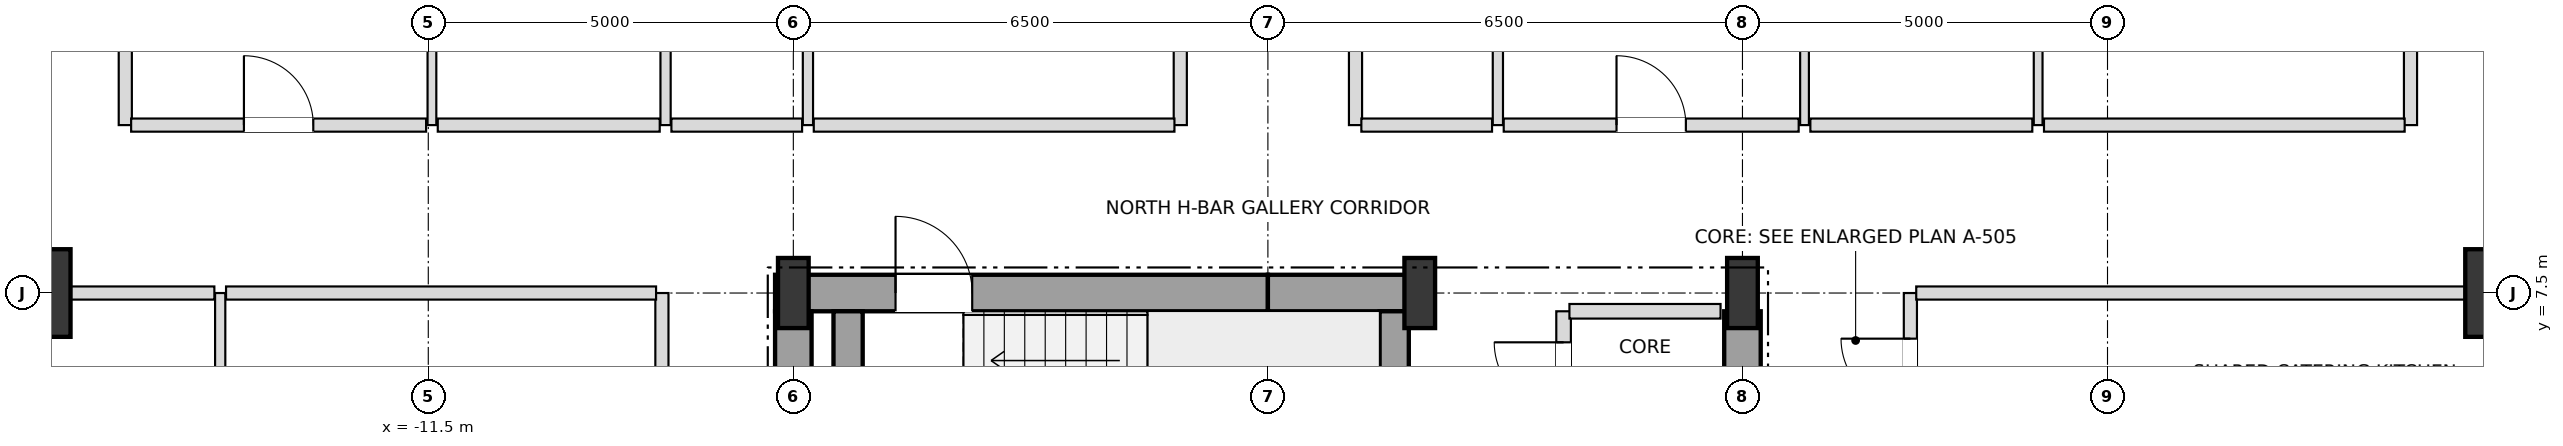
"""IFC4 building model, lengths in metres.
Left out: names, types, materials, properties, quantities, classifications, styles, units other than length and angle.
Written with IfcOpenShell. Run it as: python <this file> out.ifc"""

import sys

from ifc_helpers import new_model, si_unit, direction, frame, frame_2d, origin, origin_2d, place, context, subcontext, project, spatial, rectangle, i_section, extrude, element, fill, save


model = new_model("IFC4")
c1 = context("Model", 3, precision=1e-05, world=origin(), true_north=direction((0.0, 1.0)))
c2 = subcontext(c1, "Body", "Model", "MODEL_VIEW")
j1 = project(units=[si_unit("LENGTHUNIT", "METRE"), si_unit("PLANEANGLEUNIT", "RADIAN")], contexts=[c1])
p1 = place(None, origin())
s1 = spatial("IfcSite", under=j1, at=p1, CompositionType="ELEMENT")
p2 = place(p1, origin())
s2 = spatial("IfcBuilding", under=s1, at=p2, CompositionType="ELEMENT")
p3 = place(p2, frame((0.0, 0.0, 133.2)))
s3 = spatial("IfcBuildingStorey", under=s2, at=p3, CompositionType="ELEMENT", Elevation=133.2)
for number, where, z_axis, x_axis in (
    (1, (-6.5, 7.5, 0.0), (0.0, 0.0, 1.0), (1.0, 0.0, 0.0)),
    (2, (2.08, 7.5, 0.0), (0.0, 0.0, 1.0), (1.0, 0.0, 0.0)),
    (3, (6.5, 7.5, 0.0), (0.0, 0.0, 1.0), (1.0, 0.0, 0.0)),
):
    element("IfcColumn", number, at=place(p3, frame(where, z_axis=z_axis, x_axis=x_axis)), inside=s3, PredefinedType="COLUMN", context=c2, shape_type="SweptSolid", body=[
        extrude(i_section(OverallWidth=0.42, OverallDepth=0.96, WebThickness=0.022, FlangeThickness=0.034, at=origin_2d()), origin(), (0.0, 0.0, 1.0), 3.6),
    ])
for number, where, z_axis, x_axis in (
    (4, (17.0, 7.5, 0.0), (0.0, 0.0, 1.0), (1.0, 0.0, 0.0)),
    (5, (-17.0, 7.5, 0.0), (0.0, 0.0, 1.0), (1.0, 0.0, 0.0)),
):
    element("IfcColumn", number, at=place(p3, frame(where, z_axis=z_axis, x_axis=x_axis)), inside=s3, PredefinedType="USERDEFINED", context=c2, shape_type="SweptSolid", body=[
        extrude(rectangle(XDim=1.2, YDim=1.2, at=origin_2d()), origin(), (0.0, 0.0, 1.0), 3.6),
    ])
p4 = place(p3, frame((-6.75, 7.5, 0.0), z_axis=(0.0, 0.0, 1.0), x_axis=(1.0, 0.0, 0.0)))
e6 = element("IfcWall", 6, at=p4, inside=s3, PredefinedType="SHEAR", context=c2, shape_type="SweptSolid", body=[
    extrude(rectangle(XDim=6.75, YDim=0.5, at=frame_2d((3.375, 0.0))), origin(), (0.0, 0.0, 1.0), 3.38),
])
p5 = place(p4, frame((1.65, 0.0, 0.0)))
e7 = element("IfcOpeningElement", 7, at=p5, cuts=e6, PredefinedType="OPENING", context=c2, shape_type="SweptSolid", body=[
    extrude(rectangle(XDim=1.05, YDim=2.15, at=frame_2d((0.525, 1.075))), frame((0.0, 0.26, 0.0), z_axis=(0.0, -1.0, 0.0), x_axis=(1.0, 0.0, 0.0)), (0.0, 0.0, 1.0), 0.52),
])
p6 = place(p3, frame((0.0, 7.5, 0.0), z_axis=(0.0, 0.0, 1.0), x_axis=(1.0, 0.0, 0.0)))
e8 = element("IfcWall", 8, at=p6, inside=s3, PredefinedType="SHEAR", context=c2, shape_type="SweptSolid", body=[
    extrude(rectangle(XDim=2.08, YDim=0.5, at=frame_2d((1.04, 0.0))), origin(), (0.0, 0.0, 1.0), 3.38),
])
for number, where, z_axis, x_axis in (
    (9, (-6.5, 3.95, 0.0), (0.0, 0.0, 1.0), (0.0, 1.0, 0.0)),
    (10, (6.5, 3.95, 0.0), (0.0, 0.0, 1.0), (0.0, 1.0, 0.0)),
):
    element("IfcWall", number, at=place(p3, frame(where, z_axis=z_axis, x_axis=x_axis)), inside=s3, PredefinedType="SHEAR", context=c2, shape_type="SweptSolid", body=[
        extrude(rectangle(XDim=3.3, YDim=0.5, at=frame_2d((1.65, 0.0))), origin(), (0.0, 0.0, 1.0), 3.38),
    ])
for number, where, z_axis, x_axis in (
    (11, (1.73, 3.95, 0.0), (0.0, 0.0, 1.0), (0.0, 1.0, 0.0)),
    (12, (-5.75, 3.95, 0.0), (0.0, 0.0, 1.0), (0.0, 1.0, 0.0)),
):
    element("IfcWall", number, at=place(p3, frame(where, z_axis=z_axis, x_axis=x_axis)), inside=s3, PredefinedType="SHEAR", context=c2, shape_type="SweptSolid", body=[
        extrude(rectangle(XDim=3.3, YDim=0.4, at=frame_2d((1.65, 0.0))), origin(), (0.0, 0.0, 1.0), 3.38),
    ])
p7 = place(p3, frame((-15.65, 9.8, 0.0), z_axis=(0.0, 0.0, 1.0), x_axis=(0.0, 1.0, 0.0)))
e13 = element("IfcWall", 13, at=p7, inside=s3, PredefinedType="PARTITIONING", context=c2, shape_type="SweptSolid", body=[
    extrude(rectangle(XDim=7.35, YDim=0.18, at=frame_2d((3.675, 0.0))), origin(), (0.0, 0.0, 1.0), 2.736),
])
p8 = place(p3, frame((-14.35, -7.5, 0.0), z_axis=(0.0, 0.0, 1.0), x_axis=(0.0, 1.0, 0.0)))
e14 = element("IfcWall", 14, at=p8, inside=s3, PredefinedType="PARTITIONING", context=c2, shape_type="SweptSolid", body=[
    extrude(rectangle(XDim=15.0, YDim=0.14, at=frame_2d((7.5, 0.0))), origin(), (0.0, 0.0, 1.0), 3.38),
])
p9 = place(p8, frame((3.475, 0.0, 0.0)))
e15 = element("IfcOpeningElement", 15, at=p9, cuts=e14, PredefinedType="OPENING", context=c2, shape_type="SweptSolid", body=[
    extrude(rectangle(XDim=0.95, YDim=2.1, at=frame_2d((0.475, 1.05))), frame((0.0, 0.08, 0.0), z_axis=(0.0, -1.0, 0.0), x_axis=(1.0, 0.0, 0.0)), (0.0, 0.0, 1.0), 0.16),
])
p10 = place(p3, frame((-11.45, 9.8, 0.0), z_axis=(0.0, 0.0, 1.0), x_axis=(0.0, 1.0, 0.0)))
e16 = element("IfcWall", 16, at=p10, inside=s3, PredefinedType="PARTITIONING", context=c2, shape_type="SweptSolid", body=[
    extrude(rectangle(XDim=7.35, YDim=0.12, at=frame_2d((3.675, 0.0))), origin(), (0.0, 0.0, 1.0), 2.736),
])
p11 = place(p10, frame((3.713, 0.0, 0.0)))
e17 = element("IfcOpeningElement", 17, at=p11, cuts=e16, PredefinedType="OPENING", context=c2, shape_type="SweptSolid", body=[
    extrude(rectangle(XDim=0.95, YDim=2.1, at=frame_2d((0.475, 1.05))), frame((0.0, 0.07, 0.0), z_axis=(0.0, -1.0, 0.0), x_axis=(1.0, 0.0, 0.0)), (0.0, 0.0, 1.0), 0.14),
])
p12 = place(p3, frame((-8.3, -7.5, 0.0), z_axis=(0.0, 0.0, 1.0), x_axis=(0.0, 1.0, 0.0)))
e18 = element("IfcWall", 18, at=p12, inside=s3, PredefinedType="PARTITIONING", context=c2, shape_type="SweptSolid", body=[
    extrude(rectangle(XDim=15.0, YDim=0.18, at=frame_2d((7.5, 0.0))), origin(), (0.0, 0.0, 1.0), 3.38),
])
p13 = place(p12, frame((2.495, 0.0, 0.0)))
e19 = element("IfcOpeningElement", 19, at=p13, cuts=e18, PredefinedType="OPENING", context=c2, shape_type="SweptSolid", body=[
    extrude(rectangle(XDim=0.95, YDim=2.15, at=frame_2d((0.475, 1.075))), frame((0.0, 0.1, 0.0), z_axis=(0.0, -1.0, 0.0), x_axis=(1.0, 0.0, 0.0)), (0.0, 0.0, 1.0), 0.2),
])
p14 = place(p3, frame((-8.25, 9.8, 0.0), z_axis=(0.0, 0.0, 1.0), x_axis=(0.0, 1.0, 0.0)))
e20 = element("IfcWall", 20, at=p14, inside=s3, PredefinedType="PARTITIONING", context=c2, shape_type="SweptSolid", body=[
    extrude(rectangle(XDim=7.35, YDim=0.14, at=frame_2d((3.675, 0.0))), origin(), (0.0, 0.0, 1.0), 2.816),
])
p15 = place(p14, frame((3.22, 0.0, 0.0)))
e21 = element("IfcOpeningElement", 21, at=p15, cuts=e20, PredefinedType="OPENING", context=c2, shape_type="SweptSolid", body=[
    extrude(rectangle(XDim=0.9, YDim=2.1, at=frame_2d((0.45, 1.05))), frame((0.0, 0.08, 0.0), z_axis=(0.0, -1.0, 0.0), x_axis=(1.0, 0.0, 0.0)), (0.0, 0.0, 1.0), 0.16),
])
p16 = place(p3, frame((-6.3, 9.8, 0.0), z_axis=(0.0, 0.0, 1.0), x_axis=(0.0, 1.0, 0.0)))
e22 = element("IfcWall", 22, at=p16, inside=s3, PredefinedType="PARTITIONING", context=c2, shape_type="SweptSolid", body=[
    extrude(rectangle(XDim=13.35, YDim=0.14, at=frame_2d((6.675, 0.0))), origin(), (0.0, 0.0, 1.0), 2.816),
])
p17 = place(p16, frame((11.051, 0.0, 0.0)))
e23 = element("IfcOpeningElement", 23, at=p17, cuts=e22, PredefinedType="OPENING", context=c2, shape_type="SweptSolid", body=[
    extrude(rectangle(XDim=0.9, YDim=2.1, at=frame_2d((0.45, 1.05))), frame((0.0, 0.08, 0.0), z_axis=(0.0, -1.0, 0.0), x_axis=(1.0, 0.0, 0.0)), (0.0, 0.0, 1.0), 0.16),
])
for number, where, z_axis, x_axis in (
    (24, (-1.2, 9.8, 0.0), (0.0, 0.0, 1.0), (0.0, 1.0, 0.0)),
    (25, (1.2, 9.8, 0.0), (0.0, 0.0, 1.0), (0.0, 1.0, 0.0)),
):
    element("IfcWall", number, at=place(p3, frame(where, z_axis=z_axis, x_axis=x_axis)), inside=s3, PredefinedType="PARTITIONING", context=c2, shape_type="SweptSolid", body=[
        extrude(rectangle(XDim=13.35, YDim=0.18, at=frame_2d((6.675, 0.0))), origin(), (0.0, 0.0, 1.0), 2.816),
    ])
p18 = place(p3, frame((3.15, 9.8, 0.0), z_axis=(0.0, 0.0, 1.0), x_axis=(0.0, 1.0, 0.0)))
e26 = element("IfcWall", 26, at=p18, inside=s3, PredefinedType="PARTITIONING", context=c2, shape_type="SweptSolid", body=[
    extrude(rectangle(XDim=7.35, YDim=0.14, at=frame_2d((3.675, 0.0))), origin(), (0.0, 0.0, 1.0), 3.38),
])
p19 = place(p18, frame((3.22, 0.0, 0.0)))
e27 = element("IfcOpeningElement", 27, at=p19, cuts=e26, PredefinedType="OPENING", context=c2, shape_type="SweptSolid", body=[
    extrude(rectangle(XDim=0.9, YDim=2.1, at=frame_2d((0.45, 1.05))), frame((0.0, 0.08, 0.0), z_axis=(0.0, -1.0, 0.0), x_axis=(1.0, 0.0, 0.0)), (0.0, 0.0, 1.0), 0.16),
])
p20 = place(p3, frame((4.05, 5.55, 0.0), z_axis=(0.0, 0.0, 1.0), x_axis=(0.0, 1.0, 0.0)))
e28 = element("IfcWall", 28, at=p20, inside=s3, PredefinedType="SOLIDWALL", context=c2, shape_type="SweptSolid", body=[
    extrude(rectangle(XDim=1.7, YDim=0.2, at=frame_2d((0.85, 0.0))), origin(), (0.0, 0.0, 1.0), 3.38),
])
p21 = place(p20, frame((0.325, 0.0, 0.0)))
e29 = element("IfcOpeningElement", 29, at=p21, cuts=e28, PredefinedType="OPENING", context=c2, shape_type="SweptSolid", body=[
    extrude(rectangle(XDim=0.95, YDim=2.15, at=frame_2d((0.475, 1.075))), frame((0.0, 0.11, 0.0), z_axis=(0.0, -1.0, 0.0), x_axis=(1.0, 0.0, 0.0)), (0.0, 0.0, 1.0), 0.22),
])
p22 = place(p3, frame((7.35, 9.8, 0.0), z_axis=(0.0, 0.0, 1.0), x_axis=(0.0, 1.0, 0.0)))
e30 = element("IfcWall", 30, at=p22, inside=s3, PredefinedType="PARTITIONING", context=c2, shape_type="SweptSolid", body=[
    extrude(rectangle(XDim=13.35, YDim=0.12, at=frame_2d((6.675, 0.0))), origin(), (0.0, 0.0, 1.0), 2.816),
])
p23 = place(p22, frame((3.195, 0.0, 0.0)))
e31 = element("IfcOpeningElement", 31, at=p23, cuts=e30, PredefinedType="OPENING", context=c2, shape_type="SweptSolid", body=[
    extrude(rectangle(XDim=0.95, YDim=2.1, at=frame_2d((0.475, 1.05))), frame((0.0, 0.07, 0.0), z_axis=(0.0, -1.0, 0.0), x_axis=(1.0, 0.0, 0.0)), (0.0, 0.0, 1.0), 0.14),
])
p24 = place(p22, frame((11.051, 0.0, 0.0)))
e32 = element("IfcOpeningElement", 32, at=p24, cuts=e30, PredefinedType="OPENING", context=c2, shape_type="SweptSolid", body=[
    extrude(rectangle(XDim=0.9, YDim=2.1, at=frame_2d((0.45, 1.05))), frame((0.0, 0.07, 0.0), z_axis=(0.0, -1.0, 0.0), x_axis=(1.0, 0.0, 0.0)), (0.0, 0.0, 1.0), 0.14),
])
p25 = place(p3, frame((8.8, -7.5, 0.0), z_axis=(0.0, 0.0, 1.0), x_axis=(0.0, 1.0, 0.0)))
e33 = element("IfcWall", 33, at=p25, inside=s3, PredefinedType="PARTITIONING", context=c2, shape_type="SweptSolid", body=[
    extrude(rectangle(XDim=15.0, YDim=0.18, at=frame_2d((7.5, 0.0))), origin(), (0.0, 0.0, 1.0), 3.38),
])
p26 = place(p25, frame((2.075, 0.0, 0.0)))
e34 = element("IfcOpeningElement", 34, at=p26, cuts=e33, PredefinedType="OPENING", context=c2, shape_type="SweptSolid", body=[
    extrude(rectangle(XDim=0.95, YDim=2.15, at=frame_2d((0.475, 1.075))), frame((0.0, 0.1, 0.0), z_axis=(0.0, -1.0, 0.0), x_axis=(1.0, 0.0, 0.0)), (0.0, 0.0, 1.0), 0.2),
])
p27 = place(p25, frame((8.475, 0.0, 0.0)))
e35 = element("IfcOpeningElement", 35, at=p27, cuts=e33, PredefinedType="OPENING", context=c2, shape_type="SweptSolid", body=[
    extrude(rectangle(XDim=0.95, YDim=2.15, at=frame_2d((0.475, 1.075))), frame((0.0, 0.1, 0.0), z_axis=(0.0, -1.0, 0.0), x_axis=(1.0, 0.0, 0.0)), (0.0, 0.0, 1.0), 0.2),
])
p28 = place(p25, frame((13.425, 0.0, 0.0)))
e36 = element("IfcOpeningElement", 36, at=p28, cuts=e33, PredefinedType="OPENING", context=c2, shape_type="SweptSolid", body=[
    extrude(rectangle(XDim=0.95, YDim=2.15, at=frame_2d((0.475, 1.075))), frame((0.0, 0.1, 0.0), z_axis=(0.0, -1.0, 0.0), x_axis=(1.0, 0.0, 0.0)), (0.0, 0.0, 1.0), 0.2),
])
p29 = place(p3, frame((10.55, 9.8, 0.0), z_axis=(0.0, 0.0, 1.0), x_axis=(0.0, 1.0, 0.0)))
e37 = element("IfcWall", 37, at=p29, inside=s3, PredefinedType="PARTITIONING", context=c2, shape_type="SweptSolid", body=[
    extrude(rectangle(XDim=13.35, YDim=0.12, at=frame_2d((6.675, 0.0))), origin(), (0.0, 0.0, 1.0), 2.816),
])
p30 = place(p29, frame((3.713, 0.0, 0.0)))
e38 = element("IfcOpeningElement", 38, at=p30, cuts=e37, PredefinedType="OPENING", context=c2, shape_type="SweptSolid", body=[
    extrude(rectangle(XDim=0.95, YDim=2.1, at=frame_2d((0.475, 1.05))), frame((0.0, 0.07, 0.0), z_axis=(0.0, -1.0, 0.0), x_axis=(1.0, 0.0, 0.0)), (0.0, 0.0, 1.0), 0.14),
])
p31 = place(p29, frame((11.051, 0.0, 0.0)))
e39 = element("IfcOpeningElement", 39, at=p31, cuts=e37, PredefinedType="OPENING", context=c2, shape_type="SweptSolid", body=[
    extrude(rectangle(XDim=0.9, YDim=2.1, at=frame_2d((0.45, 1.05))), frame((0.0, 0.07, 0.0), z_axis=(0.0, -1.0, 0.0), x_axis=(1.0, 0.0, 0.0)), (0.0, 0.0, 1.0), 0.14),
])
p32 = place(p3, frame((15.65, 9.8, 0.0), z_axis=(0.0, 0.0, 1.0), x_axis=(0.0, 1.0, 0.0)))
e40 = element("IfcWall", 40, at=p32, inside=s3, PredefinedType="PARTITIONING", context=c2, shape_type="SweptSolid", body=[
    extrude(rectangle(XDim=7.35, YDim=0.18, at=frame_2d((3.675, 0.0))), origin(), (0.0, 0.0, 1.0), 2.736),
])
p33 = place(p3, frame((4.13, 7.25, 0.0), z_axis=(0.0, 0.0, 1.0), x_axis=(1.0, 0.0, 0.0)))
e41 = element("IfcWall", 41, at=p33, inside=s3, PredefinedType="SOLIDWALL", context=c2, shape_type="SweptSolid", body=[
    extrude(rectangle(XDim=2.07, YDim=0.2, at=frame_2d((1.035, 0.0))), origin(), (0.0, 0.0, 1.0), 3.38),
])
p34 = place(p3, frame((-20.15, 7.5, 0.0), z_axis=(0.0, 0.0, 1.0), x_axis=(1.0, 0.0, 0.0)))
e42 = element("IfcWall", 42, at=p34, inside=s3, PredefinedType="PARTITIONING", context=c2, shape_type="SweptSolid", body=[
    extrude(rectangle(XDim=5.72, YDim=0.18, at=frame_2d((2.86, 0.0))), origin(), (0.0, 0.0, 1.0), 2.816),
])
p35 = place(p3, frame((-14.27, 7.5, 0.0), z_axis=(0.0, 0.0, 1.0), x_axis=(1.0, 0.0, 0.0)))
e43 = element("IfcWall", 43, at=p35, inside=s3, PredefinedType="PARTITIONING", context=c2, shape_type="SweptSolid", body=[
    extrude(rectangle(XDim=5.89, YDim=0.18, at=frame_2d((2.945, 0.0))), origin(), (0.0, 0.0, 1.0), 2.816),
])
p36 = place(p3, frame((8.88, 7.5, 0.0), z_axis=(0.0, 0.0, 1.0), x_axis=(1.0, 0.0, 0.0)))
e44 = element("IfcWall", 44, at=p36, inside=s3, PredefinedType="PARTITIONING", context=c2, shape_type="SweptSolid", body=[
    extrude(rectangle(XDim=11.27, YDim=0.18, at=frame_2d((5.635, 0.0))), origin(), (0.0, 0.0, 1.0), 2.816),
])
p37 = place(p3, frame((-15.57, 9.8, 0.0), z_axis=(0.0, 0.0, 1.0), x_axis=(1.0, 0.0, 0.0)))
e45 = element("IfcWall", 45, at=p37, inside=s3, PredefinedType="PARTITIONING", context=c2, shape_type="SweptSolid", body=[
    extrude(rectangle(XDim=4.04, YDim=0.18, at=frame_2d((2.02, 0.0))), origin(), (0.0, 0.0, 1.0), 3.38),
])
p38 = place(p37, frame((1.545, 0.0, 0.0)))
e46 = element("IfcOpeningElement", 46, at=p38, cuts=e45, PredefinedType="OPENING", context=c2, shape_type="SweptSolid", body=[
    extrude(rectangle(XDim=0.95, YDim=2.15, at=frame_2d((0.475, 1.075))), frame((0.0, 0.1, 0.0), z_axis=(0.0, -1.0, 0.0), x_axis=(1.0, 0.0, 0.0)), (0.0, 0.0, 1.0), 0.2),
])
p39 = place(p3, frame((-11.37, 9.8, 0.0), z_axis=(0.0, 0.0, 1.0), x_axis=(1.0, 0.0, 0.0)))
e47 = element("IfcWall", 47, at=p39, inside=s3, PredefinedType="PARTITIONING", context=c2, shape_type="SweptSolid", body=[
    extrude(rectangle(XDim=3.04, YDim=0.18, at=frame_2d((1.52, 0.0))), origin(), (0.0, 0.0, 1.0), 3.38),
])
p40 = place(p3, frame((-8.17, 9.8, 0.0), z_axis=(0.0, 0.0, 1.0), x_axis=(1.0, 0.0, 0.0)))
e48 = element("IfcWall", 48, at=p40, inside=s3, PredefinedType="PARTITIONING", context=c2, shape_type="SweptSolid", body=[
    extrude(rectangle(XDim=1.79, YDim=0.18, at=frame_2d((0.895, 0.0))), origin(), (0.0, 0.0, 1.0), 2.816),
])
p41 = place(p3, frame((-6.22, 9.8, 0.0), z_axis=(0.0, 0.0, 1.0), x_axis=(1.0, 0.0, 0.0)))
e49 = element("IfcWall", 49, at=p41, inside=s3, PredefinedType="PARTITIONING", context=c2, shape_type="SweptSolid", body=[
    extrude(rectangle(XDim=4.94, YDim=0.18, at=frame_2d((2.47, 0.0))), origin(), (0.0, 0.0, 1.0), 3.38),
])
p42 = place(p3, frame((1.28, 9.8, 0.0), z_axis=(0.0, 0.0, 1.0), x_axis=(1.0, 0.0, 0.0)))
e50 = element("IfcWall", 50, at=p42, inside=s3, PredefinedType="PARTITIONING", context=c2, shape_type="SweptSolid", body=[
    extrude(rectangle(XDim=1.79, YDim=0.18, at=frame_2d((0.895, 0.0))), origin(), (0.0, 0.0, 1.0), 3.38),
])
p43 = place(p3, frame((3.23, 9.8, 0.0), z_axis=(0.0, 0.0, 1.0), x_axis=(1.0, 0.0, 0.0)))
e51 = element("IfcWall", 51, at=p43, inside=s3, PredefinedType="PARTITIONING", context=c2, shape_type="SweptSolid", body=[
    extrude(rectangle(XDim=4.04, YDim=0.18, at=frame_2d((2.02, 0.0))), origin(), (0.0, 0.0, 1.0), 2.816),
])
p44 = place(p43, frame((1.545, 0.0, 0.0)))
e52 = element("IfcOpeningElement", 52, at=p44, cuts=e51, PredefinedType="OPENING", context=c2, shape_type="SweptSolid", body=[
    extrude(rectangle(XDim=0.95, YDim=2.15, at=frame_2d((0.475, 1.075))), frame((0.0, 0.1, 0.0), z_axis=(0.0, -1.0, 0.0), x_axis=(1.0, 0.0, 0.0)), (0.0, 0.0, 1.0), 0.2),
])
p45 = place(p3, frame((7.43, 9.8, 0.0), z_axis=(0.0, 0.0, 1.0), x_axis=(1.0, 0.0, 0.0)))
e53 = element("IfcWall", 53, at=p45, inside=s3, PredefinedType="PARTITIONING", context=c2, shape_type="SweptSolid", body=[
    extrude(rectangle(XDim=3.04, YDim=0.18, at=frame_2d((1.52, 0.0))), origin(), (0.0, 0.0, 1.0), 3.38),
])
p46 = place(p3, frame((10.63, 9.8, 0.0), z_axis=(0.0, 0.0, 1.0), x_axis=(1.0, 0.0, 0.0)))
e54 = element("IfcWall", 54, at=p46, inside=s3, PredefinedType="PARTITIONING", context=c2, shape_type="SweptSolid", body=[
    extrude(rectangle(XDim=4.94, YDim=0.18, at=frame_2d((2.47, 0.0))), origin(), (0.0, 0.0, 1.0), 3.38),
])
p47 = place(p5, origin())
e55 = element("IfcDoor", 55, at=p47, inside=s3, OperationType="SINGLE_SWING_LEFT", PredefinedType="DOOR", context=c2, shape_type="SweptSolid", body=[
    extrude(rectangle(XDim=1.05, YDim=2.15, at=frame_2d((0.525, 1.075))), frame((0.0, 0.025, 0.0), z_axis=(0.0, -1.0, 0.0), x_axis=(1.0, 0.0, 0.0)), (0.0, 0.0, 1.0), 0.05),
])
fill(e7, e55)
p48 = place(p21, origin())
e56 = element("IfcDoor", 56, at=p48, inside=s3, OperationType="SINGLE_SWING_RIGHT", PredefinedType="DOOR", context=c2, shape_type="SweptSolid", body=[
    extrude(rectangle(XDim=0.95, YDim=2.15, at=frame_2d((0.475, 1.075))), frame((0.0, 0.025, 0.0), z_axis=(0.0, -1.0, 0.0), x_axis=(1.0, 0.0, 0.0)), (0.0, 0.0, 1.0), 0.05),
])
fill(e29, e56)
p49 = place(p38, origin())
e57 = element("IfcDoor", 57, at=p49, inside=s3, OperationType="SINGLE_SWING_LEFT", PredefinedType="DOOR", context=c2, shape_type="SweptSolid", body=[
    extrude(rectangle(XDim=0.95, YDim=2.15, at=frame_2d((0.475, 1.075))), frame((0.0, 0.025, 0.0), z_axis=(0.0, -1.0, 0.0), x_axis=(1.0, 0.0, 0.0)), (0.0, 0.0, 1.0), 0.05),
])
fill(e46, e57)
p50 = place(p44, origin())
e58 = element("IfcDoor", 58, at=p50, inside=s3, OperationType="SINGLE_SWING_LEFT", PredefinedType="DOOR", context=c2, shape_type="SweptSolid", body=[
    extrude(rectangle(XDim=0.95, YDim=2.15, at=frame_2d((0.475, 1.075))), frame((0.0, 0.025, 0.0), z_axis=(0.0, -1.0, 0.0), x_axis=(1.0, 0.0, 0.0)), (0.0, 0.0, 1.0), 0.05),
])
fill(e52, e58)
p51 = place(p28, origin())
e59 = element("IfcDoor", 59, at=p51, inside=s3, OperationType="SINGLE_SWING_RIGHT", PredefinedType="DOOR", context=c2, shape_type="SweptSolid", body=[
    extrude(rectangle(XDim=0.95, YDim=2.15, at=frame_2d((0.475, 1.075))), frame((0.0, 0.025, 0.0), z_axis=(0.0, -1.0, 0.0), x_axis=(1.0, 0.0, 0.0)), (0.0, 0.0, 1.0), 0.05),
])
fill(e36, e59)
save(model, sys.argv[1])
